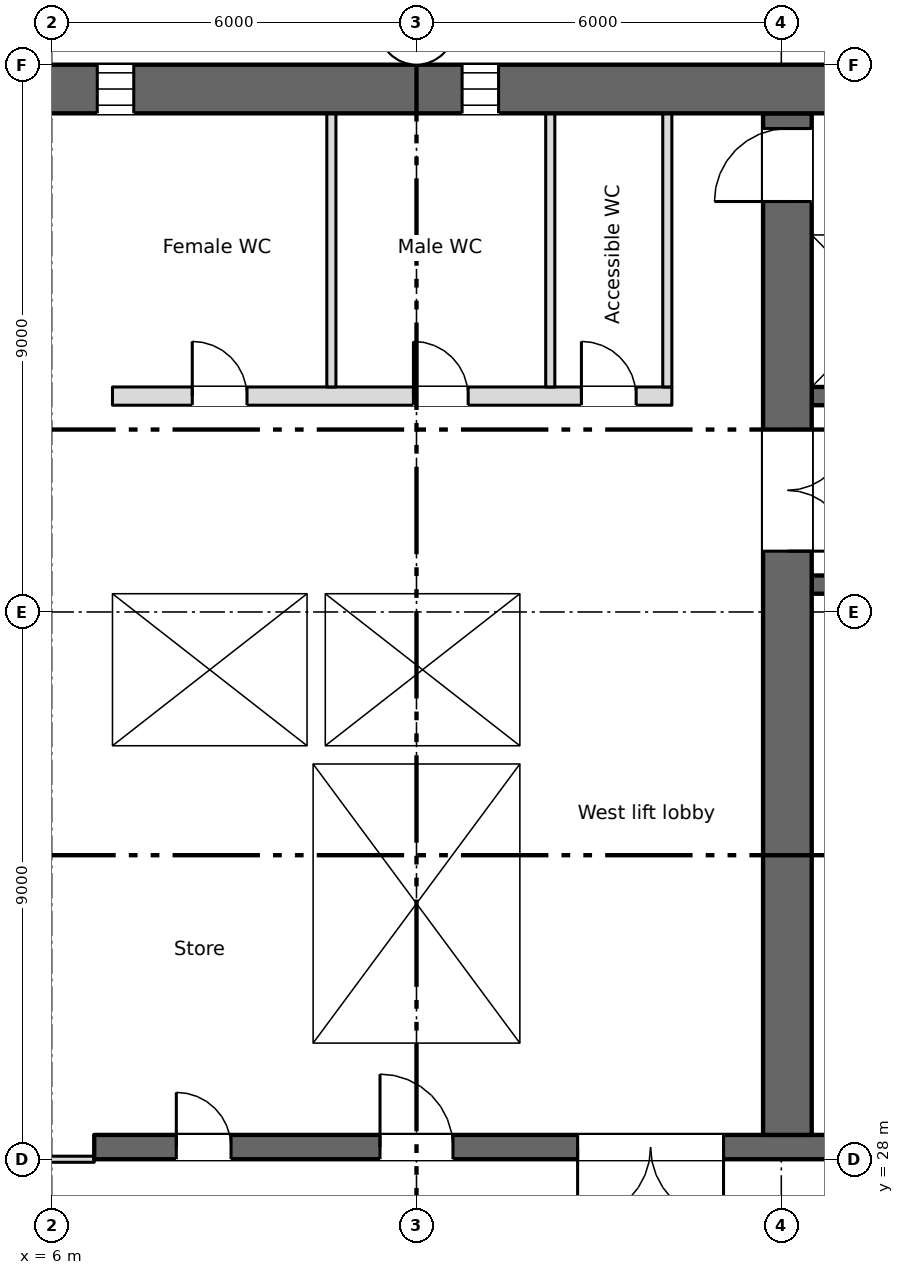
"""IFC4 building model, lengths in metres.
Left out: names, types, materials, properties, quantities, classifications, styles, units other than length and angle.
Written with IfcOpenShell. Run it as: python <this file> out.ifc"""

import sys

from ifc_helpers import new_model, si_unit, direction, frame, frame_2d, origin, place, context, subcontext, project, spatial, rectangle, extrude, element, fill, save


model = new_model("IFC4")
c1 = context("Model", 3, precision=1e-05, world=origin(), true_north=direction((0.0, 1.0)))
c2 = subcontext(c1, "Body", "Model", "MODEL_VIEW")
j1 = project(units=[si_unit("LENGTHUNIT", "METRE"), si_unit("PLANEANGLEUNIT", "RADIAN")], contexts=[c1])
p1 = place(None, origin())
s1 = spatial("IfcSite", under=j1, at=p1, CompositionType="ELEMENT")
p2 = place(p1, origin())
s2 = spatial("IfcBuilding", under=s1, at=p2, CompositionType="ELEMENT")
p3 = place(p2, frame((0.0, 0.0, 151.25)))
s3 = spatial("IfcBuildingStorey", under=s2, at=p3, CompositionType="ELEMENT", Elevation=151.25)
p4 = place(p3, frame((5.55, 45.6, 0.0), z_axis=(0.0, 0.0, 1.0), x_axis=(1.0, 0.0, 0.0)))
e1 = element("IfcWall", 1, at=p4, inside=s3, PredefinedType="SHEAR", context=c2, shape_type="SweptSolid", body=[
    extrude(rectangle(XDim=60.9, YDim=0.8, at=frame_2d((30.45, 0.0))), origin(), (0.0, 0.0, 1.0), 3.35),
])
p5 = place(p4, frame((1.2, 0.0, 0.6)))
e2 = element("IfcOpeningElement", 2, at=p5, cuts=e1, PredefinedType="OPENING", context=c2, shape_type="SweptSolid", body=[
    extrude(rectangle(XDim=0.6, YDim=2.4, at=frame_2d((0.3, 1.2))), frame((0.0, 0.41, 0.0), z_axis=(0.0, -1.0, 0.0), x_axis=(1.0, 0.0, 0.0)), (0.0, 0.0, 1.0), 0.82),
])
p6 = place(p4, frame((7.2, 0.0, 0.6)))
e3 = element("IfcOpeningElement", 3, at=p6, cuts=e1, PredefinedType="OPENING", context=c2, shape_type="SweptSolid", body=[
    extrude(rectangle(XDim=0.6, YDim=2.4, at=frame_2d((0.3, 1.2))), frame((0.0, 0.41, 0.0), z_axis=(0.0, -1.0, 0.0), x_axis=(1.0, 0.0, 0.0)), (0.0, 0.0, 1.0), 0.82),
])
p7 = place(p3, frame((6.7, 28.2, 0.0), z_axis=(0.0, 0.0, 1.0), x_axis=(1.0, 0.0, 0.0)))
e4 = element("IfcWall", 4, at=p7, inside=s3, PredefinedType="SHEAR", context=c2, shape_type="SweptSolid", body=[
    extrude(rectangle(XDim=57.8, YDim=0.4, at=frame_2d((28.9, 0.0))), origin(), (0.0, 0.0, 1.0), 3.35),
])
p8 = place(p7, frame((13.85, 0.0, 0.0)))
e5 = element("IfcOpeningElement", 5, at=p8, cuts=e4, PredefinedType="OPENING", context=c2, shape_type="SweptSolid", body=[
    extrude(rectangle(XDim=0.9, YDim=2.1, at=frame_2d((0.45, 1.05))), frame((0.0, 0.21, 0.0), z_axis=(0.0, -1.0, 0.0), x_axis=(1.0, 0.0, 0.0)), (0.0, 0.0, 1.0), 0.42),
])
p9 = place(p7, frame((48.562, 0.0, 0.0)))
e6 = element("IfcOpeningElement", 6, at=p9, cuts=e4, PredefinedType="OPENING", context=c2, shape_type="SweptSolid", body=[
    extrude(rectangle(XDim=0.9, YDim=2.1, at=frame_2d((0.45, 1.05))), frame((0.0, 0.21, 0.0), z_axis=(0.0, -1.0, 0.0), x_axis=(1.0, 0.0, 0.0)), (0.0, 0.0, 1.0), 0.42),
])
p10 = place(p7, frame((51.137, 0.0, 0.0)))
e7 = element("IfcOpeningElement", 7, at=p10, cuts=e4, PredefinedType="OPENING", context=c2, shape_type="SweptSolid", body=[
    extrude(rectangle(XDim=0.9, YDim=2.1, at=frame_2d((0.45, 1.05))), frame((0.0, 0.21, 0.0), z_axis=(0.0, -1.0, 0.0), x_axis=(1.0, 0.0, 0.0)), (0.0, 0.0, 1.0), 0.42),
])
p11 = place(p7, frame((1.35, 0.0, 0.0)))
e8 = element("IfcOpeningElement", 8, at=p11, cuts=e4, PredefinedType="OPENING", context=c2, shape_type="SweptSolid", body=[
    extrude(rectangle(XDim=0.9, YDim=2.1, at=frame_2d((0.45, 1.05))), frame((0.0, 0.21, 0.0), z_axis=(0.0, -1.0, 0.0), x_axis=(1.0, 0.0, 0.0)), (0.0, 0.0, 1.0), 0.42),
])
p12 = place(p7, frame((4.7, 0.0, 0.0)))
e9 = element("IfcOpeningElement", 9, at=p12, cuts=e4, PredefinedType="OPENING", context=c2, shape_type="SweptSolid", body=[
    extrude(rectangle(XDim=1.2, YDim=2.1, at=frame_2d((0.6, 1.05))), frame((0.0, 0.21, 0.0), z_axis=(0.0, -1.0, 0.0), x_axis=(1.0, 0.0, 0.0)), (0.0, 0.0, 1.0), 0.42),
])
p13 = place(p7, frame((31.7, 0.0, 0.0)))
e10 = element("IfcOpeningElement", 10, at=p13, cuts=e4, PredefinedType="OPENING", context=c2, shape_type="SweptSolid", body=[
    extrude(rectangle(XDim=1.2, YDim=2.1, at=frame_2d((0.6, 1.05))), frame((0.0, 0.21, 0.0), z_axis=(0.0, -1.0, 0.0), x_axis=(1.0, 0.0, 0.0)), (0.0, 0.0, 1.0), 0.42),
])
p14 = place(p7, frame((55.2, 0.0, 0.0)))
e11 = element("IfcOpeningElement", 11, at=p14, cuts=e4, PredefinedType="OPENING", context=c2, shape_type="SweptSolid", body=[
    extrude(rectangle(XDim=1.2, YDim=2.1, at=frame_2d((0.6, 1.05))), frame((0.0, 0.21, 0.0), z_axis=(0.0, -1.0, 0.0), x_axis=(1.0, 0.0, 0.0)), (0.0, 0.0, 1.0), 0.42),
])
p15 = place(p7, frame((21.7, 0.0, 0.0)))
e12 = element("IfcOpeningElement", 12, at=p15, cuts=e4, PredefinedType="OPENING", context=c2, shape_type="SweptSolid", body=[
    extrude(rectangle(XDim=1.2, YDim=2.1, at=frame_2d((0.6, 1.05))), frame((0.0, 0.21, 0.0), z_axis=(0.0, -1.0, 0.0), x_axis=(1.0, 0.0, 0.0)), (0.0, 0.0, 1.0), 0.42),
])
p16 = place(p7, frame((41.7, 0.0, 0.0)))
e13 = element("IfcOpeningElement", 13, at=p16, cuts=e4, PredefinedType="OPENING", context=c2, shape_type="SweptSolid", body=[
    extrude(rectangle(XDim=1.2, YDim=2.1, at=frame_2d((0.6, 1.05))), frame((0.0, 0.21, 0.0), z_axis=(0.0, -1.0, 0.0), x_axis=(1.0, 0.0, 0.0)), (0.0, 0.0, 1.0), 0.42),
])
p17 = place(p7, frame((24.85, 0.0, 0.0)))
e14 = element("IfcOpeningElement", 14, at=p17, cuts=e4, PredefinedType="OPENING", context=c2, shape_type="SweptSolid", body=[
    extrude(rectangle(XDim=2.4, YDim=2.1, at=frame_2d((1.2, 1.05))), frame((0.0, 0.21, 0.0), z_axis=(0.0, -1.0, 0.0), x_axis=(1.0, 0.0, 0.0)), (0.0, 0.0, 1.0), 0.42),
])
p18 = place(p7, frame((37.35, 0.0, 0.0)))
e15 = element("IfcOpeningElement", 15, at=p18, cuts=e4, PredefinedType="OPENING", context=c2, shape_type="SweptSolid", body=[
    extrude(rectangle(XDim=2.4, YDim=2.1, at=frame_2d((1.2, 1.05))), frame((0.0, 0.21, 0.0), z_axis=(0.0, -1.0, 0.0), x_axis=(1.0, 0.0, 0.0)), (0.0, 0.0, 1.0), 0.42),
])
p19 = place(p7, frame((7.95, 0.0, 0.0)))
e16 = element("IfcOpeningElement", 16, at=p19, cuts=e4, PredefinedType="OPENING", context=c2, shape_type="SweptSolid", body=[
    extrude(rectangle(XDim=2.4, YDim=2.1, at=frame_2d((1.2, 1.05))), frame((0.0, 0.21, 0.0), z_axis=(0.0, -1.0, 0.0), x_axis=(1.0, 0.0, 0.0)), (0.0, 0.0, 1.0), 0.42),
])
p20 = place(p7, frame((28.85, 0.0, 0.0)))
e17 = element("IfcOpeningElement", 17, at=p20, cuts=e4, PredefinedType="OPENING", context=c2, shape_type="SweptSolid", body=[
    extrude(rectangle(XDim=0.9, YDim=2.1, at=frame_2d((0.45, 1.05))), frame((0.0, 0.21, 0.0), z_axis=(0.0, -1.0, 0.0), x_axis=(1.0, 0.0, 0.0)), (0.0, 0.0, 1.0), 0.42),
])
p21 = place(p7, frame((34.85, 0.0, 0.0)))
e18 = element("IfcOpeningElement", 18, at=p21, cuts=e4, PredefinedType="OPENING", context=c2, shape_type="SweptSolid", body=[
    extrude(rectangle(XDim=0.9, YDim=2.1, at=frame_2d((0.45, 1.05))), frame((0.0, 0.21, 0.0), z_axis=(0.0, -1.0, 0.0), x_axis=(1.0, 0.0, 0.0)), (0.0, 0.0, 1.0), 0.42),
])
p22 = place(p3, frame((6.85, 28.4, 0.0), z_axis=(0.0, 0.0, 1.0), x_axis=(0.0, 1.0, 0.0)))
e19 = element("IfcWall", 19, at=p22, inside=s3, PredefinedType="SHEAR", context=c2, shape_type="SweptSolid", body=[
    extrude(rectangle(XDim=16.8, YDim=0.3, at=frame_2d((8.4, 0.0))), origin(), (0.0, 0.0, 1.0), 3.35),
])
p23 = place(p3, frame((18.1, 28.4, 0.0), z_axis=(0.0, 0.0, 1.0), x_axis=(0.0, 1.0, 0.0)))
e20 = element("IfcWall", 20, at=p23, inside=s3, PredefinedType="SHEAR", context=c2, shape_type="SweptSolid", body=[
    extrude(rectangle(XDim=16.8, YDim=0.8, at=frame_2d((8.4, 0.0))), origin(), (0.0, 0.0, 1.0), 3.35),
])
p24 = place(p23, frame((9.6, 0.0, 0.0)))
e21 = element("IfcOpeningElement", 21, at=p24, cuts=e20, PredefinedType="OPENING", context=c2, shape_type="SweptSolid", body=[
    extrude(rectangle(XDim=2.0, YDim=2.1, at=frame_2d((1.0, 1.05))), frame((0.0, 0.41, 0.0), z_axis=(0.0, -1.0, 0.0), x_axis=(1.0, 0.0, 0.0)), (0.0, 0.0, 1.0), 0.82),
])
p25 = place(p23, frame((15.35, 0.0, 0.0)))
e22 = element("IfcOpeningElement", 22, at=p25, cuts=e20, PredefinedType="OPENING", context=c2, shape_type="SweptSolid", body=[
    extrude(rectangle(XDim=1.2, YDim=2.1, at=frame_2d((0.6, 1.05))), frame((0.0, 0.41, 0.0), z_axis=(0.0, -1.0, 0.0), x_axis=(1.0, 0.0, 0.0)), (0.0, 0.0, 1.0), 0.82),
])
for number, where, z_axis, x_axis in (
    (23, (10.15, 28.4, 0.0), (0.0, 0.0, 1.0), (0.0, 1.0, 0.0)),
    (24, (13.85, 28.4, 0.0), (0.0, 0.0, 1.0), (0.0, 1.0, 0.0)),
):
    element("IfcWall", number, at=place(p3, frame(where, z_axis=z_axis, x_axis=x_axis)), inside=s3, PredefinedType="SHEAR", context=c2, shape_type="SweptSolid", body=[
        extrude(rectangle(XDim=6.1, YDim=0.3, at=frame_2d((3.05, 0.0))), origin(), (0.0, 0.0, 1.0), 3.35),
    ])
p26 = place(p3, frame((7.0, 34.65, 0.0), z_axis=(0.0, 0.0, 1.0), x_axis=(1.0, 0.0, 0.0)))
e25 = element("IfcWall", 25, at=p26, inside=s3, PredefinedType="SHEAR", context=c2, shape_type="SweptSolid", body=[
    extrude(rectangle(XDim=7.0, YDim=0.3, at=frame_2d((3.5, 0.0))), origin(), (0.0, 0.0, 1.0), 3.35),
])
p27 = place(p3, frame((18.5, 34.65, 0.0), z_axis=(0.0, 0.0, 1.0), x_axis=(1.0, 0.0, 0.0)))
e26 = element("IfcWall", 26, at=p27, inside=s3, PredefinedType="SHEAR", context=c2, shape_type="SweptSolid", body=[
    extrude(rectangle(XDim=12.2, YDim=0.3, at=frame_2d((6.1, 0.0))), origin(), (0.0, 0.0, 1.0), 3.35),
])
p28 = place(p27, frame((9.8, 0.0, 0.0)))
e27 = element("IfcOpeningElement", 27, at=p28, cuts=e26, PredefinedType="OPENING", context=c2, shape_type="SweptSolid", body=[
    extrude(rectangle(XDim=1.1, YDim=2.1, at=frame_2d((0.55, 1.05))), frame((0.0, 0.16, 0.0), z_axis=(0.0, -1.0, 0.0), x_axis=(1.0, 0.0, 0.0)), (0.0, 0.0, 1.0), 0.32),
])
p29 = place(p3, frame((7.0, 37.45, 0.0), z_axis=(0.0, 0.0, 1.0), x_axis=(1.0, 0.0, 0.0)))
e28 = element("IfcWall", 28, at=p29, inside=s3, PredefinedType="SHEAR", context=c2, shape_type="SweptSolid", body=[
    extrude(rectangle(XDim=7.0, YDim=0.3, at=frame_2d((3.5, 0.0))), origin(), (0.0, 0.0, 1.0), 3.35),
])
p30 = place(p3, frame((30.7, 37.45, 0.0), z_axis=(0.0, 0.0, 1.0), x_axis=(-1.0, 0.0, 0.0)))
e29 = element("IfcWall", 29, at=p30, inside=s3, PredefinedType="SHEAR", context=c2, shape_type="SweptSolid", body=[
    extrude(rectangle(XDim=12.2, YDim=0.3, at=frame_2d((6.1, 0.0))), origin(), (0.0, 0.0, 1.0), 3.35),
])
p31 = place(p30, frame((7.4, 0.0, 0.0)))
e30 = element("IfcOpeningElement", 30, at=p31, cuts=e29, PredefinedType="OPENING", context=c2, shape_type="SweptSolid", body=[
    extrude(rectangle(XDim=0.9, YDim=2.1, at=frame_2d((0.45, 1.05))), frame((0.0, 0.16, 0.0), z_axis=(0.0, -1.0, 0.0), x_axis=(1.0, 0.0, 0.0)), (0.0, 0.0, 1.0), 0.32),
])
p32 = place(p3, frame((13.85, 34.8, 0.0), z_axis=(0.0, 0.0, 1.0), x_axis=(0.0, 1.0, 0.0)))
e31 = element("IfcWall", 31, at=p32, inside=s3, PredefinedType="SHEAR", context=c2, shape_type="SweptSolid", body=[
    extrude(rectangle(XDim=2.5, YDim=0.3, at=frame_2d((1.25, 0.0))), origin(), (0.0, 0.0, 1.0), 3.35),
])
p33 = place(p3, frame((18.5, 40.55, 0.0), z_axis=(0.0, 0.0, 1.0), x_axis=(1.0, 0.0, 0.0)))
e32 = element("IfcWall", 32, at=p33, inside=s3, PredefinedType="SHEAR", context=c2, shape_type="SweptSolid", body=[
    extrude(rectangle(XDim=41.0, YDim=0.3, at=frame_2d((20.5, 0.0))), origin(), (0.0, 0.0, 1.0), 3.35),
])
p34 = place(p33, frame((18.65, 0.0, 0.0)))
e33 = element("IfcOpeningElement", 33, at=p34, cuts=e32, PredefinedType="OPENING", context=c2, shape_type="SweptSolid", body=[
    extrude(rectangle(XDim=0.9, YDim=2.1, at=frame_2d((0.45, 1.05))), frame((0.0, 0.16, 0.0), z_axis=(0.0, -1.0, 0.0), x_axis=(1.0, 0.0, 0.0)), (0.0, 0.0, 1.0), 0.32),
])
p35 = place(p33, frame((6.175, 0.0, 0.0)))
e34 = element("IfcOpeningElement", 34, at=p35, cuts=e32, PredefinedType="OPENING", context=c2, shape_type="SweptSolid", body=[
    extrude(rectangle(XDim=1.1, YDim=2.1, at=frame_2d((0.55, 1.05))), frame((0.0, 0.16, 0.0), z_axis=(0.0, -1.0, 0.0), x_axis=(1.0, 0.0, 0.0)), (0.0, 0.0, 1.0), 0.32),
])
p36 = place(p33, frame((8.925, 0.0, 0.0)))
e35 = element("IfcOpeningElement", 35, at=p36, cuts=e32, PredefinedType="OPENING", context=c2, shape_type="SweptSolid", body=[
    extrude(rectangle(XDim=1.1, YDim=2.1, at=frame_2d((0.55, 1.05))), frame((0.0, 0.16, 0.0), z_axis=(0.0, -1.0, 0.0), x_axis=(1.0, 0.0, 0.0)), (0.0, 0.0, 1.0), 0.32),
])
p37 = place(p33, frame((11.675, 0.0, 0.0)))
e36 = element("IfcOpeningElement", 36, at=p37, cuts=e32, PredefinedType="OPENING", context=c2, shape_type="SweptSolid", body=[
    extrude(rectangle(XDim=1.1, YDim=2.1, at=frame_2d((0.55, 1.05))), frame((0.0, 0.16, 0.0), z_axis=(0.0, -1.0, 0.0), x_axis=(1.0, 0.0, 0.0)), (0.0, 0.0, 1.0), 0.32),
])
p38 = place(p33, frame((30.925, 0.0, 0.0)))
e37 = element("IfcOpeningElement", 37, at=p38, cuts=e32, PredefinedType="OPENING", context=c2, shape_type="SweptSolid", body=[
    extrude(rectangle(XDim=1.1, YDim=2.1, at=frame_2d((0.55, 1.05))), frame((0.0, 0.16, 0.0), z_axis=(0.0, -1.0, 0.0), x_axis=(1.0, 0.0, 0.0)), (0.0, 0.0, 1.0), 0.32),
])
p39 = place(p33, frame((33.675, 0.0, 0.0)))
e38 = element("IfcOpeningElement", 38, at=p39, cuts=e32, PredefinedType="OPENING", context=c2, shape_type="SweptSolid", body=[
    extrude(rectangle(XDim=1.1, YDim=2.1, at=frame_2d((0.55, 1.05))), frame((0.0, 0.16, 0.0), z_axis=(0.0, -1.0, 0.0), x_axis=(1.0, 0.0, 0.0)), (0.0, 0.0, 1.0), 0.32),
])
p40 = place(p33, frame((36.375, 0.0, 0.0)))
e39 = element("IfcOpeningElement", 39, at=p40, cuts=e32, PredefinedType="OPENING", context=c2, shape_type="SweptSolid", body=[
    extrude(rectangle(XDim=1.2, YDim=2.1, at=frame_2d((0.6, 1.05))), frame((0.0, 0.16, 0.0), z_axis=(0.0, -1.0, 0.0), x_axis=(1.0, 0.0, 0.0)), (0.0, 0.0, 1.0), 0.32),
])
p41 = place(p33, frame((39.15, 0.0, 0.0)))
e40 = element("IfcOpeningElement", 40, at=p41, cuts=e32, PredefinedType="OPENING", context=c2, shape_type="SweptSolid", body=[
    extrude(rectangle(XDim=1.2, YDim=2.1, at=frame_2d((0.6, 1.05))), frame((0.0, 0.16, 0.0), z_axis=(0.0, -1.0, 0.0), x_axis=(1.0, 0.0, 0.0)), (0.0, 0.0, 1.0), 0.32),
])
p42 = place(p3, frame((18.5, 43.35, 0.0), z_axis=(0.0, 0.0, 1.0), x_axis=(1.0, 0.0, 0.0)))
e41 = element("IfcWall", 41, at=p42, inside=s3, PredefinedType="SHEAR", context=c2, shape_type="SweptSolid", body=[
    extrude(rectangle(XDim=41.0, YDim=0.3, at=frame_2d((20.5, 0.0))), origin(), (0.0, 0.0, 1.0), 3.35),
])
p43 = place(p3, frame((7.0, 40.55, 0.0), z_axis=(0.0, 0.0, 1.0), x_axis=(1.0, 0.0, 0.0)))
e42 = element("IfcWall", 42, at=p43, inside=s3, PredefinedType="PARTITIONING", context=c2, shape_type="SweptSolid", body=[
    extrude(rectangle(XDim=9.2, YDim=0.3, at=frame_2d((4.6, 0.0))), origin(), (0.0, 0.0, 1.0), 3.35),
])
p44 = place(p43, frame((1.312, 0.0, 0.0)))
e43 = element("IfcOpeningElement", 43, at=p44, cuts=e42, PredefinedType="OPENING", context=c2, shape_type="SweptSolid", body=[
    extrude(rectangle(XDim=0.9, YDim=2.1, at=frame_2d((0.45, 1.05))), frame((0.0, 0.16, 0.0), z_axis=(0.0, -1.0, 0.0), x_axis=(1.0, 0.0, 0.0)), (0.0, 0.0, 1.0), 0.32),
])
p45 = place(p43, frame((4.95, 0.0, 0.0)))
e44 = element("IfcOpeningElement", 44, at=p45, cuts=e42, PredefinedType="OPENING", context=c2, shape_type="SweptSolid", body=[
    extrude(rectangle(XDim=0.9, YDim=2.1, at=frame_2d((0.45, 1.05))), frame((0.0, 0.16, 0.0), z_axis=(0.0, -1.0, 0.0), x_axis=(1.0, 0.0, 0.0)), (0.0, 0.0, 1.0), 0.32),
])
p46 = place(p43, frame((7.712, 0.0, 0.0)))
e45 = element("IfcOpeningElement", 45, at=p46, cuts=e42, PredefinedType="OPENING", context=c2, shape_type="SweptSolid", body=[
    extrude(rectangle(XDim=0.9, YDim=2.1, at=frame_2d((0.45, 1.05))), frame((0.0, 0.16, 0.0), z_axis=(0.0, -1.0, 0.0), x_axis=(1.0, 0.0, 0.0)), (0.0, 0.0, 1.0), 0.32),
])
p47 = place(p3, frame((10.35, 34.8, 0.0), z_axis=(0.0, 0.0, 1.0), x_axis=(0.0, 1.0, 0.0)))
e46 = element("IfcWall", 46, at=p47, inside=s3, PredefinedType="SHEAR", context=c2, shape_type="SweptSolid", body=[
    extrude(rectangle(XDim=2.5, YDim=0.3, at=frame_2d((1.25, 0.0))), origin(), (0.0, 0.0, 1.0), 3.35),
])
for number, where, z_axis, x_axis in (
    (47, (16.125, 40.7, 0.0), (0.0, 0.0, 1.0), (0.0, 1.0, 0.0)),
    (48, (10.6, 40.7, 0.0), (0.0, 0.0, 1.0), (0.0, 1.0, 0.0)),
    (49, (14.2, 40.7, 0.0), (0.0, 0.0, 1.0), (0.0, 1.0, 0.0)),
):
    element("IfcWall", number, at=place(p3, frame(where, z_axis=z_axis, x_axis=x_axis)), inside=s3, PredefinedType="PARTITIONING", context=c2, shape_type="SweptSolid", body=[
        extrude(rectangle(XDim=4.5, YDim=0.15, at=frame_2d((2.25, 0.0))), origin(), (0.0, 0.0, 1.0), 3.35),
    ])
p48 = place(p3, frame((0.7, 28.0, 0.0), z_axis=(0.0, 0.0, 1.0), x_axis=(1.0, 0.0, 0.0)))
e50 = element("IfcWall", 50, at=p48, inside=s3, PredefinedType="PARTITIONING", context=c2, shape_type="SweptSolid", body=[
    extrude(rectangle(XDim=6.0, YDim=0.1, at=frame_2d((3.0, 0.0))), origin(), (0.0, 0.0, 1.0), 3.35),
])
p49 = place(p48, frame((2.1, 0.0, 0.0)))
e51 = element("IfcOpeningElement", 51, at=p49, cuts=e50, PredefinedType="OPENING", context=c2, shape_type="SweptSolid", body=[
    extrude(rectangle(XDim=1.8, YDim=2.1, at=frame_2d((0.9, 1.05))), frame((0.0, 0.06, 0.0), z_axis=(0.0, -1.0, 0.0), x_axis=(1.0, 0.0, 0.0)), (0.0, 0.0, 1.0), 0.12),
])
p50 = place(p5, origin())
e52 = element("IfcWindow", 52, at=p50, inside=s3, PartitioningType="SINGLE_PANEL", PredefinedType="WINDOW", context=c2, shape_type="SweptSolid", body=[
    extrude(rectangle(XDim=0.6, YDim=2.4, at=frame_2d((0.3, 1.2))), frame((0.0, 0.03, 0.0), z_axis=(0.0, -1.0, 0.0), x_axis=(1.0, 0.0, 0.0)), (0.0, 0.0, 1.0), 0.06),
])
fill(e2, e52)
p51 = place(p6, origin())
e53 = element("IfcWindow", 53, at=p51, inside=s3, PartitioningType="SINGLE_PANEL", PredefinedType="WINDOW", context=c2, shape_type="SweptSolid", body=[
    extrude(rectangle(XDim=0.6, YDim=2.4, at=frame_2d((0.3, 1.2))), frame((0.0, 0.03, 0.0), z_axis=(0.0, -1.0, 0.0), x_axis=(1.0, 0.0, 0.0)), (0.0, 0.0, 1.0), 0.06),
])
fill(e3, e53)
p52 = place(p11, origin())
e54 = element("IfcDoor", 54, at=p52, inside=s3, OperationType="SINGLE_SWING_LEFT", PredefinedType="DOOR", context=c2, shape_type="SweptSolid", body=[
    extrude(rectangle(XDim=0.9, YDim=2.1, at=frame_2d((0.45, 1.05))), frame((0.0, 0.025, 0.0), z_axis=(0.0, -1.0, 0.0), x_axis=(1.0, 0.0, 0.0)), (0.0, 0.0, 1.0), 0.05),
])
fill(e8, e54)
p53 = place(p44, origin())
e55 = element("IfcDoor", 55, at=p53, inside=s3, OperationType="SINGLE_SWING_LEFT", PredefinedType="DOOR", context=c2, shape_type="SweptSolid", body=[
    extrude(rectangle(XDim=0.9, YDim=2.1, at=frame_2d((0.45, 1.05))), frame((0.0, 0.025, 0.0), z_axis=(0.0, -1.0, 0.0), x_axis=(1.0, 0.0, 0.0)), (0.0, 0.0, 1.0), 0.05),
])
fill(e43, e55)
p54 = place(p45, origin())
e56 = element("IfcDoor", 56, at=p54, inside=s3, OperationType="SINGLE_SWING_LEFT", PredefinedType="DOOR", context=c2, shape_type="SweptSolid", body=[
    extrude(rectangle(XDim=0.9, YDim=2.1, at=frame_2d((0.45, 1.05))), frame((0.0, 0.025, 0.0), z_axis=(0.0, -1.0, 0.0), x_axis=(1.0, 0.0, 0.0)), (0.0, 0.0, 1.0), 0.05),
])
fill(e44, e56)
p55 = place(p46, origin())
e57 = element("IfcDoor", 57, at=p55, inside=s3, OperationType="SINGLE_SWING_LEFT", PredefinedType="DOOR", context=c2, shape_type="SweptSolid", body=[
    extrude(rectangle(XDim=0.9, YDim=2.1, at=frame_2d((0.45, 1.05))), frame((0.0, 0.025, 0.0), z_axis=(0.0, -1.0, 0.0), x_axis=(1.0, 0.0, 0.0)), (0.0, 0.0, 1.0), 0.05),
])
fill(e45, e57)
p56 = place(p12, origin())
e58 = element("IfcDoor", 58, at=p56, inside=s3, OperationType="SINGLE_SWING_LEFT", PredefinedType="DOOR", context=c2, shape_type="SweptSolid", body=[
    extrude(rectangle(XDim=1.2, YDim=2.1, at=frame_2d((0.6, 1.05))), frame((0.0, 0.025, 0.0), z_axis=(0.0, -1.0, 0.0), x_axis=(1.0, 0.0, 0.0)), (0.0, 0.0, 1.0), 0.05),
])
fill(e9, e58)
p57 = place(p19, origin())
e59 = element("IfcDoor", 59, at=p57, inside=s3, OperationType="DOUBLE_DOOR_SINGLE_SWING", PredefinedType="DOOR", context=c2, shape_type="SweptSolid", body=[
    extrude(rectangle(XDim=2.4, YDim=2.1, at=frame_2d((1.2, 1.05))), frame((0.0, 0.025, 0.0), z_axis=(0.0, -1.0, 0.0), x_axis=(1.0, 0.0, 0.0)), (0.0, 0.0, 1.0), 0.05),
])
fill(e16, e59)
p58 = place(p24, origin())
e60 = element("IfcDoor", 60, at=p58, inside=s3, OperationType="DOUBLE_DOOR_SINGLE_SWING", PredefinedType="DOOR", context=c2, shape_type="SweptSolid", body=[
    extrude(rectangle(XDim=2.0, YDim=2.1, at=frame_2d((1.0, 1.05))), frame((0.0, 0.025, 0.0), z_axis=(0.0, -1.0, 0.0), x_axis=(1.0, 0.0, 0.0)), (0.0, 0.0, 1.0), 0.05),
])
fill(e21, e60)
p59 = place(p25, origin())
e61 = element("IfcDoor", 61, at=p59, inside=s3, OperationType="SINGLE_SWING_LEFT", PredefinedType="DOOR", context=c2, shape_type="SweptSolid", body=[
    extrude(rectangle(XDim=1.2, YDim=2.1, at=frame_2d((0.6, 1.05))), frame((0.0, 0.025, 0.0), z_axis=(0.0, -1.0, 0.0), x_axis=(1.0, 0.0, 0.0)), (0.0, 0.0, 1.0), 0.05),
])
fill(e22, e61)
save(model, sys.argv[1])
